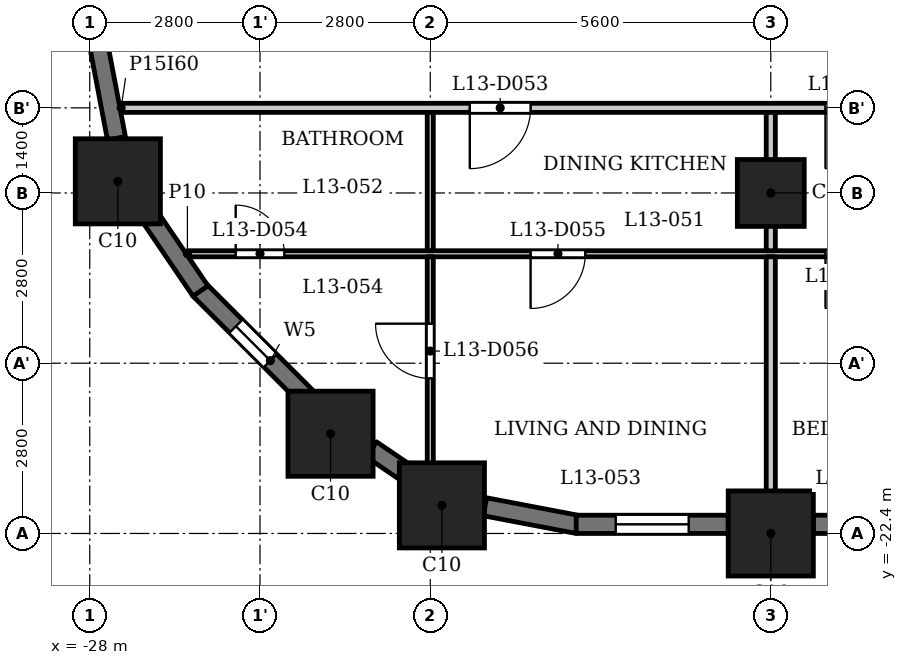
"""IFC4 building model, lengths in metres.
Left out: names, types, materials, properties, quantities, classifications, styles, units other than length and angle.
Written with IfcOpenShell. Run it as: python <this file> out.ifc"""

import sys

from ifc_helpers import new_model, si_unit, direction, frame, frame_2d, origin, origin_2d, place, context, subcontext, project, spatial, rectangle, extrude, element, fill, save


model = new_model("IFC4")
c1 = context("Model", 3, precision=1e-05, world=origin(), true_north=direction((0.0, 1.0)))
c2 = subcontext(c1, "Body", "Model", "MODEL_VIEW")
j1 = project(units=[si_unit("LENGTHUNIT", "METRE"), si_unit("PLANEANGLEUNIT", "RADIAN")], contexts=[c1])
p1 = place(None, origin())
s1 = spatial("IfcSite", under=j1, at=p1, CompositionType="ELEMENT")
p2 = place(p1, origin())
s2 = spatial("IfcBuilding", under=s1, at=p2, CompositionType="ELEMENT")
p3 = place(p2, frame((0.0, 0.0, 55.0)))
s3 = spatial("IfcBuildingStorey", under=s2, at=p3, CompositionType="ELEMENT", Elevation=55.0)
for number, where, z_axis, x_axis in (
    (1, (-22.209, -21.938, 0.0), (0.0, 0.0, 1.0), (1.0, 0.0, 0.0)),
    (2, (-16.8, -22.4, 0.0), (0.0, 0.0, 1.0), (1.0, 0.0, 0.0)),
    (3, (-27.538, -16.609, 0.0), (0.0, 0.0, 1.0), (1.0, 0.0, 0.0)),
    (4, (-24.04, -20.76, 0.0), (0.0, 0.0, 1.0), (1.0, 0.0, 0.0)),
):
    element("IfcColumn", number, at=place(p3, frame(where, z_axis=z_axis, x_axis=x_axis)), inside=s3, PredefinedType="COLUMN", context=c2, shape_type="SweptSolid", body=[
        extrude(rectangle(XDim=1.4, YDim=1.4, at=origin_2d()), origin(), (0.0, 0.0, 1.0), 3.5),
    ])
p4 = place(p3, frame((-16.8, -16.8, 0.0), z_axis=(0.0, 0.0, 1.0), x_axis=(1.0, 0.0, 0.0)))
e5 = element("IfcColumn", 5, at=p4, inside=s3, PredefinedType="COLUMN", context=c2, shape_type="SweptSolid", body=[
    extrude(rectangle(XDim=1.1, YDim=1.1, at=origin_2d()), origin(), (0.0, 0.0, 1.0), 3.5),
])
p5 = place(p3, frame((-26.197, -18.391, 0.0), z_axis=(0.0, 0.0, 1.0), x_axis=(0.707057949532, -0.707155609469, 0.0)))
e6 = element("IfcWall", 6, at=p5, inside=s3, PredefinedType="SOLIDWALL", context=c2, shape_type="SweptSolid", body=[
    extrude(rectangle(XDim=2.5, YDim=0.3, at=frame_2d((1.25, 0.0))), origin(), (0.0, 0.0, 1.0), 2.35),
])
p6 = place(p5, frame((0.85, 0.0, 0.6)))
e7 = element("IfcOpeningElement", 7, at=p6, cuts=e6, PredefinedType="OPENING", context=c2, shape_type="SweptSolid", body=[
    extrude(rectangle(XDim=0.8, YDim=1.55, at=frame_2d((0.4, 0.775))), frame((0.0, 0.16, 0.0), z_axis=(0.0, -1.0, 0.0), x_axis=(1.0, 0.0, 0.0)), (0.0, 0.0, 1.0), 0.32),
])
p7 = place(p3, frame((-23.368, -21.017, 0.0), z_axis=(0.0, 0.0, 1.0), x_axis=(0.827037530089, -0.562146710232, 0.0)))
e8 = element("IfcWall", 8, at=p7, inside=s3, PredefinedType="SOLIDWALL", context=c2, shape_type="SweptSolid", body=[
    extrude(rectangle(XDim=0.777, YDim=0.3, at=frame_2d((0.388, 0.0))), origin(), (0.0, 0.0, 1.0), 3.2),
])
p8 = place(p3, frame((-21.5, -21.961, 0.0), z_axis=(0.0, 0.0, 1.0), x_axis=(0.982297345734, -0.187328386968, 0.0)))
e9 = element("IfcWall", 9, at=p8, inside=s3, PredefinedType="SOLIDWALL", context=c2, shape_type="SweptSolid", body=[
    extrude(rectangle(XDim=1.556, YDim=0.3, at=frame_2d((0.778, 0.0))), origin(), (0.0, 0.0, 1.0), 2.35),
])
p9 = place(p3, frame((-20.0, -22.25, 0.0), z_axis=(0.0, 0.0, 1.0), x_axis=(1.0, 0.0, 0.0)))
e10 = element("IfcWall", 10, at=p9, inside=s3, PredefinedType="SOLIDWALL", context=c2, shape_type="SweptSolid", body=[
    extrude(rectangle(XDim=2.5, YDim=0.3, at=frame_2d((1.25, 0.0))), origin(), (0.0, 0.0, 1.0), 2.35),
])
p10 = place(p9, frame((0.65, 0.0, 0.6)))
e11 = element("IfcOpeningElement", 11, at=p10, cuts=e10, PredefinedType="OPENING", context=c2, shape_type="SweptSolid", body=[
    extrude(rectangle(XDim=1.2, YDim=1.55, at=frame_2d((0.6, 0.775))), frame((0.0, 0.16, 0.0), z_axis=(0.0, -1.0, 0.0), x_axis=(1.0, 0.0, 0.0)), (0.0, 0.0, 1.0), 0.32),
])
p11 = place(p3, frame((-16.1, -22.25, 0.0), z_axis=(0.0, 0.0, 1.0), x_axis=(1.0, 0.0, 0.0)))
e12 = element("IfcWall", 12, at=p11, inside=s3, PredefinedType="SOLIDWALL", context=c2, shape_type="SweptSolid", body=[
    extrude(rectangle(XDim=4.2, YDim=0.3, at=frame_2d((2.1, 0.0))), origin(), (0.0, 0.0, 1.0), 2.35),
])
p12 = place(p11, frame((0.413, 0.0, 0.6)))
e13 = element("IfcOpeningElement", 13, at=p12, cuts=e12, PredefinedType="OPENING", context=c2, shape_type="SweptSolid", body=[
    extrude(rectangle(XDim=1.2, YDim=1.55, at=frame_2d((0.6, 0.775))), frame((0.0, 0.16, 0.0), z_axis=(0.0, -1.0, 0.0), x_axis=(1.0, 0.0, 0.0)), (0.0, 0.0, 1.0), 0.32),
])
p13 = place(p11, frame((2.587, 0.0, 0.6)))
e14 = element("IfcOpeningElement", 14, at=p13, cuts=e12, PredefinedType="OPENING", context=c2, shape_type="SweptSolid", body=[
    extrude(rectangle(XDim=1.2, YDim=1.55, at=frame_2d((0.6, 0.775))), frame((0.0, 0.16, 0.0), z_axis=(0.0, -1.0, 0.0), x_axis=(1.0, 0.0, 0.0)), (0.0, 0.0, 1.0), 0.32),
])
for number, where, z_axis, x_axis in (
    (15, (-27.853, -14.372, 0.0), (0.0, 0.0, 1.0), (0.187, -0.982, 0.0)),
    (16, (-27.053, -17.126, 0.0), (0.0, 0.0, 1.0), (0.562, -0.827, 0.0)),
):
    element("IfcWall", number, at=place(p3, frame(where, z_axis=z_axis, x_axis=x_axis)), inside=s3, PredefinedType="SOLIDWALL", context=c2, shape_type="SweptSolid", body=[
        extrude(rectangle(XDim=1.556, YDim=0.3, at=frame_2d((0.778, 0.0))), origin(), (0.0, 0.0, 1.0), 2.35),
    ])
p14 = place(p3, frame((-26.394, -17.8, 0.0), z_axis=(0.0, 0.0, 1.0), x_axis=(1.0, 0.0, 0.0)))
e17 = element("IfcWall", 17, at=p14, inside=s3, PredefinedType="PARTITIONING", context=c2, shape_type="SweptSolid", body=[
    extrude(rectangle(XDim=53.034, YDim=0.1, at=frame_2d((26.517, 0.0))), origin(), (0.0, 0.0, 1.0), 3.2),
])
p15 = place(p14, frame((0.794, 0.0, 0.0)))
e18 = element("IfcOpeningElement", 18, at=p15, cuts=e17, PredefinedType="OPENING", context=c2, shape_type="SweptSolid", body=[
    extrude(rectangle(XDim=0.8, YDim=2.1, at=frame_2d((0.4, 1.05))), frame((0.0, 0.06, 0.0), z_axis=(0.0, -1.0, 0.0), x_axis=(1.0, 0.0, 0.0)), (0.0, 0.0, 1.0), 0.12),
])
p16 = place(p14, frame((5.644, 0.0, 0.0)))
e19 = element("IfcOpeningElement", 19, at=p16, cuts=e17, PredefinedType="OPENING", context=c2, shape_type="SweptSolid", body=[
    extrude(rectangle(XDim=0.9, YDim=2.1, at=frame_2d((0.45, 1.05))), frame((0.0, 0.06, 0.0), z_axis=(0.0, -1.0, 0.0), x_axis=(1.0, 0.0, 0.0)), (0.0, 0.0, 1.0), 0.12),
])
p17 = place(p14, frame((19.344, 0.0, 0.0)))
e20 = element("IfcOpeningElement", 20, at=p17, cuts=e17, PredefinedType="OPENING", context=c2, shape_type="SweptSolid", body=[
    extrude(rectangle(XDim=0.8, YDim=2.1, at=frame_2d((0.4, 1.05))), frame((0.0, 0.06, 0.0), z_axis=(0.0, -1.0, 0.0), x_axis=(1.0, 0.0, 0.0)), (0.0, 0.0, 1.0), 0.12),
])
p18 = place(p14, frame((17.094, 0.0, 0.0)))
e21 = element("IfcOpeningElement", 21, at=p18, cuts=e17, PredefinedType="OPENING", context=c2, shape_type="SweptSolid", body=[
    extrude(rectangle(XDim=0.9, YDim=2.1, at=frame_2d((0.45, 1.05))), frame((0.0, 0.06, 0.0), z_axis=(0.0, -1.0, 0.0), x_axis=(1.0, 0.0, 0.0)), (0.0, 0.0, 1.0), 0.12),
])
p19 = place(p14, frame((10.494, 0.0, 0.0)))
e22 = element("IfcOpeningElement", 22, at=p19, cuts=e17, PredefinedType="OPENING", context=c2, shape_type="SweptSolid", body=[
    extrude(rectangle(XDim=0.9, YDim=2.1, at=frame_2d((0.45, 1.05))), frame((0.0, 0.06, 0.0), z_axis=(0.0, -1.0, 0.0), x_axis=(1.0, 0.0, 0.0)), (0.0, 0.0, 1.0), 0.12),
])
p20 = place(p14, frame((13.294, 0.0, 0.0)))
e23 = element("IfcOpeningElement", 23, at=p20, cuts=e17, PredefinedType="OPENING", context=c2, shape_type="SweptSolid", body=[
    extrude(rectangle(XDim=0.9, YDim=2.1, at=frame_2d((0.45, 1.05))), frame((0.0, 0.06, 0.0), z_axis=(0.0, -1.0, 0.0), x_axis=(1.0, 0.0, 0.0)), (0.0, 0.0, 1.0), 0.12),
])
p21 = place(p14, frame((27.044, 0.0, 0.0)))
e24 = element("IfcOpeningElement", 24, at=p21, cuts=e17, PredefinedType="OPENING", context=c2, shape_type="SweptSolid", body=[
    extrude(rectangle(XDim=0.8, YDim=2.1, at=frame_2d((0.4, 1.05))), frame((0.0, 0.06, 0.0), z_axis=(0.0, -1.0, 0.0), x_axis=(1.0, 0.0, 0.0)), (0.0, 0.0, 1.0), 0.12),
])
p22 = place(p14, frame((22.444, 0.0, 0.0)))
e25 = element("IfcOpeningElement", 25, at=p22, cuts=e17, PredefinedType="OPENING", context=c2, shape_type="SweptSolid", body=[
    extrude(rectangle(XDim=0.9, YDim=2.1, at=frame_2d((0.45, 1.05))), frame((0.0, 0.06, 0.0), z_axis=(0.0, -1.0, 0.0), x_axis=(1.0, 0.0, 0.0)), (0.0, 0.0, 1.0), 0.12),
])
p23 = place(p14, frame((36.144, 0.0, 0.0)))
e26 = element("IfcOpeningElement", 26, at=p23, cuts=e17, PredefinedType="OPENING", context=c2, shape_type="SweptSolid", body=[
    extrude(rectangle(XDim=0.8, YDim=2.1, at=frame_2d((0.4, 1.05))), frame((0.0, 0.06, 0.0), z_axis=(0.0, -1.0, 0.0), x_axis=(1.0, 0.0, 0.0)), (0.0, 0.0, 1.0), 0.12),
])
p24 = place(p14, frame((33.644, 0.0, 0.0)))
e27 = element("IfcOpeningElement", 27, at=p24, cuts=e17, PredefinedType="OPENING", context=c2, shape_type="SweptSolid", body=[
    extrude(rectangle(XDim=0.9, YDim=2.1, at=frame_2d((0.45, 1.05))), frame((0.0, 0.06, 0.0), z_axis=(0.0, -1.0, 0.0), x_axis=(1.0, 0.0, 0.0)), (0.0, 0.0, 1.0), 0.12),
])
p25 = place(p14, frame((39.144, 0.0, 0.0)))
e28 = element("IfcOpeningElement", 28, at=p25, cuts=e17, PredefinedType="OPENING", context=c2, shape_type="SweptSolid", body=[
    extrude(rectangle(XDim=0.8, YDim=2.1, at=frame_2d((0.4, 1.05))), frame((0.0, 0.06, 0.0), z_axis=(0.0, -1.0, 0.0), x_axis=(1.0, 0.0, 0.0)), (0.0, 0.0, 1.0), 0.12),
])
p26 = place(p14, frame((41.494, 0.0, 0.0)))
e29 = element("IfcOpeningElement", 29, at=p26, cuts=e17, PredefinedType="OPENING", context=c2, shape_type="SweptSolid", body=[
    extrude(rectangle(XDim=0.9, YDim=2.1, at=frame_2d((0.45, 1.05))), frame((0.0, 0.06, 0.0), z_axis=(0.0, -1.0, 0.0), x_axis=(1.0, 0.0, 0.0)), (0.0, 0.0, 1.0), 0.12),
])
p27 = place(p14, frame((49.362, 0.0, 0.0)))
e30 = element("IfcOpeningElement", 30, at=p27, cuts=e17, PredefinedType="OPENING", context=c2, shape_type="SweptSolid", body=[
    extrude(rectangle(XDim=0.8, YDim=2.1, at=frame_2d((0.4, 1.05))), frame((0.0, 0.06, 0.0), z_axis=(0.0, -1.0, 0.0), x_axis=(1.0, 0.0, 0.0)), (0.0, 0.0, 1.0), 0.12),
])
p28 = place(p14, frame((45.094, 0.0, 0.0)))
e31 = element("IfcOpeningElement", 31, at=p28, cuts=e17, PredefinedType="OPENING", context=c2, shape_type="SweptSolid", body=[
    extrude(rectangle(XDim=0.9, YDim=2.1, at=frame_2d((0.45, 1.05))), frame((0.0, 0.06, 0.0), z_axis=(0.0, -1.0, 0.0), x_axis=(1.0, 0.0, 0.0)), (0.0, 0.0, 1.0), 0.12),
])
p29 = place(p3, frame((-27.484, -15.4, 0.0), z_axis=(0.0, 0.0, 1.0), x_axis=(1.0, 0.0, 0.0)))
e32 = element("IfcWall", 32, at=p29, inside=s3, PredefinedType="PARTITIONING", context=c2, shape_type="SweptSolid", body=[
    extrude(rectangle(XDim=54.968, YDim=0.15, at=frame_2d((27.484, 0.0))), origin(), (0.0, 0.0, 1.0), 3.2),
])
p30 = place(p29, frame((5.734, 0.0, 0.0)))
e33 = element("IfcOpeningElement", 33, at=p30, cuts=e32, PredefinedType="OPENING", context=c2, shape_type="SweptSolid", body=[
    extrude(rectangle(XDim=1.0, YDim=2.1, at=frame_2d((0.5, 1.05))), frame((0.0, 0.085, 0.0), z_axis=(0.0, -1.0, 0.0), x_axis=(1.0, 0.0, 0.0)), (0.0, 0.0, 1.0), 0.17),
])
p31 = place(p29, frame((11.584, 0.0, 0.0)))
e34 = element("IfcOpeningElement", 34, at=p31, cuts=e32, PredefinedType="OPENING", context=c2, shape_type="SweptSolid", body=[
    extrude(rectangle(XDim=1.0, YDim=2.1, at=frame_2d((0.5, 1.05))), frame((0.0, 0.085, 0.0), z_axis=(0.0, -1.0, 0.0), x_axis=(1.0, 0.0, 0.0)), (0.0, 0.0, 1.0), 0.17),
])
p32 = place(p29, frame((22.534, 0.0, 0.0)))
e35 = element("IfcOpeningElement", 35, at=p32, cuts=e32, PredefinedType="OPENING", context=c2, shape_type="SweptSolid", body=[
    extrude(rectangle(XDim=1.0, YDim=2.1, at=frame_2d((0.5, 1.05))), frame((0.0, 0.085, 0.0), z_axis=(0.0, -1.0, 0.0), x_axis=(1.0, 0.0, 0.0)), (0.0, 0.0, 1.0), 0.17),
])
p33 = place(p29, frame((33.734, 0.0, 0.0)))
e36 = element("IfcOpeningElement", 36, at=p33, cuts=e32, PredefinedType="OPENING", context=c2, shape_type="SweptSolid", body=[
    extrude(rectangle(XDim=1.0, YDim=2.1, at=frame_2d((0.5, 1.05))), frame((0.0, 0.085, 0.0), z_axis=(0.0, -1.0, 0.0), x_axis=(1.0, 0.0, 0.0)), (0.0, 0.0, 1.0), 0.17),
])
p34 = place(p29, frame((42.334, 0.0, 0.0)))
e37 = element("IfcOpeningElement", 37, at=p34, cuts=e32, PredefinedType="OPENING", context=c2, shape_type="SweptSolid", body=[
    extrude(rectangle(XDim=1.0, YDim=2.1, at=frame_2d((0.5, 1.05))), frame((0.0, 0.085, 0.0), z_axis=(0.0, -1.0, 0.0), x_axis=(1.0, 0.0, 0.0)), (0.0, 0.0, 1.0), 0.17),
])
p35 = place(p29, frame((45.184, 0.0, 0.0)))
e38 = element("IfcOpeningElement", 38, at=p35, cuts=e32, PredefinedType="OPENING", context=c2, shape_type="SweptSolid", body=[
    extrude(rectangle(XDim=1.0, YDim=2.1, at=frame_2d((0.5, 1.05))), frame((0.0, 0.085, 0.0), z_axis=(0.0, -1.0, 0.0), x_axis=(1.0, 0.0, 0.0)), (0.0, 0.0, 1.0), 0.17),
])
p36 = place(p3, frame((-22.4, -21.72, 0.0), z_axis=(0.0, 0.0, 1.0), x_axis=(0.0, 1.0, 0.0)))
e39 = element("IfcWall", 39, at=p36, inside=s3, PredefinedType="PARTITIONING", context=c2, shape_type="SweptSolid", body=[
    extrude(rectangle(XDim=3.87, YDim=0.1, at=frame_2d((1.935, 0.0))), origin(), (0.0, 0.0, 1.0), 3.2),
])
p37 = place(p36, frame((1.87, 0.0, 0.0)))
e40 = element("IfcOpeningElement", 40, at=p37, cuts=e39, PredefinedType="OPENING", context=c2, shape_type="SweptSolid", body=[
    extrude(rectangle(XDim=0.9, YDim=2.1, at=frame_2d((0.45, 1.05))), frame((0.0, 0.06, 0.0), z_axis=(0.0, -1.0, 0.0), x_axis=(1.0, 0.0, 0.0)), (0.0, 0.0, 1.0), 0.12),
])
p38 = place(p3, frame((-22.4, -17.75, 0.0), z_axis=(0.0, 0.0, 1.0), x_axis=(0.0, 1.0, 0.0)))
e41 = element("IfcWall", 41, at=p38, inside=s3, PredefinedType="PARTITIONING", context=c2, shape_type="SweptSolid", body=[
    extrude(rectangle(XDim=2.275, YDim=0.1, at=frame_2d((1.137, 0.0))), origin(), (0.0, 0.0, 1.0), 3.2),
])
p39 = place(p3, frame((-16.8, -23.08, 0.0), z_axis=(0.0, 0.0, 1.0), x_axis=(0.0, 1.0, 0.0)))
e42 = element("IfcWall", 42, at=p39, inside=s3, PredefinedType="PARTITIONING", context=c2, shape_type="SweptSolid", body=[
    extrude(rectangle(XDim=5.23, YDim=0.15, at=frame_2d((2.615, 0.0))), origin(), (0.0, 0.0, 1.0), 3.2),
])
p40 = place(p3, frame((-16.8, -17.75, 0.0), z_axis=(0.0, 0.0, 1.0), x_axis=(0.0, 1.0, 0.0)))
e43 = element("IfcWall", 43, at=p40, inside=s3, PredefinedType="PARTITIONING", context=c2, shape_type="SweptSolid", body=[
    extrude(rectangle(XDim=2.275, YDim=0.15, at=frame_2d((1.137, 0.0))), origin(), (0.0, 0.0, 1.0), 3.2),
])
p41 = place(p30, origin())
e44 = element("IfcDoor", 44, at=p41, inside=s3, OperationType="SINGLE_SWING_LEFT", PredefinedType="DOOR", context=c2, shape_type="SweptSolid", body=[
    extrude(rectangle(XDim=1.0, YDim=2.1, at=frame_2d((0.5, 1.05))), frame((0.0, 0.025, 0.0), z_axis=(0.0, -1.0, 0.0), x_axis=(1.0, 0.0, 0.0)), (0.0, 0.0, 1.0), 0.05),
])
fill(e33, e44)
p42 = place(p15, origin())
e45 = element("IfcDoor", 45, at=p42, inside=s3, OperationType="SINGLE_SWING_RIGHT", PredefinedType="DOOR", context=c2, shape_type="SweptSolid", body=[
    extrude(rectangle(XDim=0.8, YDim=2.1, at=frame_2d((0.4, 1.05))), frame((0.0, 0.025, 0.0), z_axis=(0.0, -1.0, 0.0), x_axis=(1.0, 0.0, 0.0)), (0.0, 0.0, 1.0), 0.05),
])
fill(e18, e45)
p43 = place(p16, origin())
e46 = element("IfcDoor", 46, at=p43, inside=s3, OperationType="SINGLE_SWING_LEFT", PredefinedType="DOOR", context=c2, shape_type="SweptSolid", body=[
    extrude(rectangle(XDim=0.9, YDim=2.1, at=frame_2d((0.45, 1.05))), frame((0.0, 0.025, 0.0), z_axis=(0.0, -1.0, 0.0), x_axis=(1.0, 0.0, 0.0)), (0.0, 0.0, 1.0), 0.05),
])
fill(e19, e46)
p44 = place(p37, origin())
e47 = element("IfcDoor", 47, at=p44, inside=s3, OperationType="SINGLE_SWING_LEFT", PredefinedType="DOOR", context=c2, shape_type="SweptSolid", body=[
    extrude(rectangle(XDim=0.9, YDim=2.1, at=frame_2d((0.45, 1.05))), frame((0.0, 0.025, 0.0), z_axis=(0.0, -1.0, 0.0), x_axis=(1.0, 0.0, 0.0)), (0.0, 0.0, 1.0), 0.05),
])
fill(e40, e47)
p45 = place(p31, origin())
e48 = element("IfcDoor", 48, at=p45, inside=s3, OperationType="SINGLE_SWING_LEFT", PredefinedType="DOOR", context=c2, shape_type="SweptSolid", body=[
    extrude(rectangle(XDim=1.0, YDim=2.1, at=frame_2d((0.5, 1.05))), frame((0.0, 0.025, 0.0), z_axis=(0.0, -1.0, 0.0), x_axis=(1.0, 0.0, 0.0)), (0.0, 0.0, 1.0), 0.05),
])
fill(e34, e48)
p46 = place(p19, origin())
e49 = element("IfcDoor", 49, at=p46, inside=s3, OperationType="SINGLE_SWING_LEFT", PredefinedType="DOOR", context=c2, shape_type="SweptSolid", body=[
    extrude(rectangle(XDim=0.9, YDim=2.1, at=frame_2d((0.45, 1.05))), frame((0.0, 0.025, 0.0), z_axis=(0.0, -1.0, 0.0), x_axis=(1.0, 0.0, 0.0)), (0.0, 0.0, 1.0), 0.05),
])
fill(e22, e49)
p47 = place(p6, origin())
e50 = element("IfcWindow", 50, at=p47, inside=s3, PartitioningType="SINGLE_PANEL", PredefinedType="WINDOW", context=c2, shape_type="SweptSolid", body=[
    extrude(rectangle(XDim=0.8, YDim=1.55, at=frame_2d((0.4, 0.775))), frame((0.0, 0.03, 0.0), z_axis=(0.0, -1.0, 0.0), x_axis=(1.0, 0.0, 0.0)), (0.0, 0.0, 1.0), 0.06),
])
fill(e7, e50)
p48 = place(p10, origin())
e51 = element("IfcWindow", 51, at=p48, inside=s3, PartitioningType="SINGLE_PANEL", PredefinedType="WINDOW", context=c2, shape_type="SweptSolid", body=[
    extrude(rectangle(XDim=1.2, YDim=1.55, at=frame_2d((0.6, 0.775))), frame((0.0, 0.03, 0.0), z_axis=(0.0, -1.0, 0.0), x_axis=(1.0, 0.0, 0.0)), (0.0, 0.0, 1.0), 0.06),
])
fill(e11, e51)
save(model, sys.argv[1])
